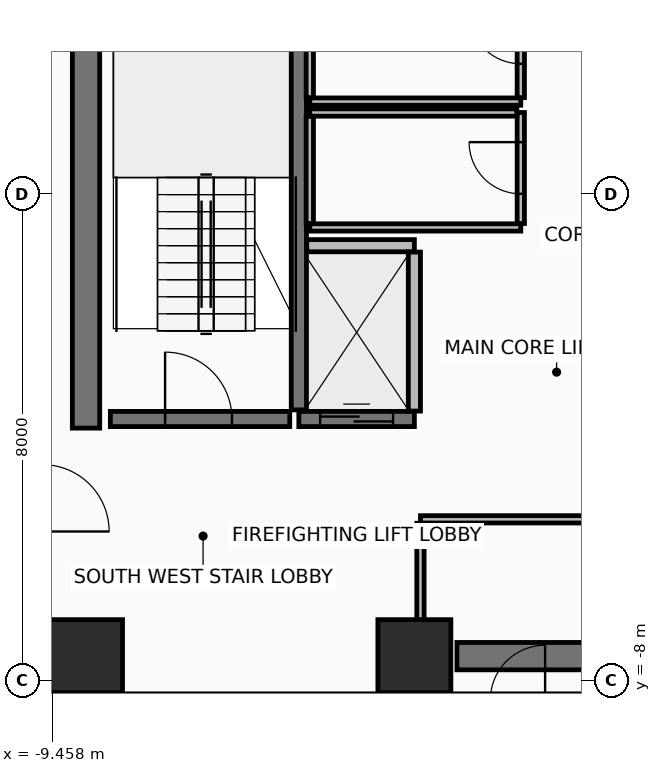
"""IFC4 building model, lengths in metres.
Left out: names, types, materials, properties, quantities, classifications, styles, units other than length and angle.
Written with IfcOpenShell. Run it as: python <this file> out.ifc"""

import sys

from ifc_helpers import new_model, si_unit, direction, frame, frame_2d, origin, origin_2d, place, context, subcontext, project, spatial, rectangle, extrude, element, fill, save


model = new_model("IFC4")
c1 = context("Model", 3, precision=1e-05, world=origin(), true_north=direction((0.0, 1.0)))
c2 = subcontext(c1, "Body", "Model", "MODEL_VIEW")
j1 = project(units=[si_unit("LENGTHUNIT", "METRE"), si_unit("PLANEANGLEUNIT", "RADIAN")], contexts=[c1])
p1 = place(None, origin())
s1 = spatial("IfcSite", under=j1, at=p1, CompositionType="ELEMENT")
p2 = place(p1, origin())
s2 = spatial("IfcBuilding", under=s1, at=p2, CompositionType="ELEMENT")
p3 = place(p2, frame((0.0, 0.0, 204.05)))
s3 = spatial("IfcBuildingStorey", under=s2, at=p3, CompositionType="ELEMENT", Elevation=204.05)
for number, where, z_axis, x_axis in (
    (1, (-8.9, -7.6, 0.0), (0.0, 0.0, 1.0), (1.0, 0.0, 0.0)),
    (2, (-3.5, -7.6, 0.0), (0.0, 0.0, 1.0), (1.0, 0.0, 0.0)),
):
    element("IfcColumn", number, at=place(p3, frame(where, z_axis=z_axis, x_axis=x_axis)), inside=s3, PredefinedType="COLUMN", context=c2, shape_type="SweptSolid", body=[
        extrude(rectangle(XDim=1.2, YDim=1.2, at=origin_2d()), origin(), (0.0, 0.0, 1.0), 3.6),
    ])
p4 = place(p3, frame((-2.8, -7.6, 0.0), z_axis=(0.0, 0.0, 1.0), x_axis=(1.0, 0.0, 0.0)))
e3 = element("IfcWall", 3, at=p4, inside=s3, PredefinedType="SHEAR", context=c2, shape_type="SweptSolid", body=[
    extrude(rectangle(XDim=5.38, YDim=0.45, at=frame_2d((2.69, 0.0))), origin(), (0.0, 0.0, 1.0), 3.42),
])
p5 = place(p3, frame((-8.9, -3.85, 0.0), z_axis=(0.0, 0.0, 1.0), x_axis=(0.0, 1.0, 0.0)))
e4 = element("IfcWall", 4, at=p5, inside=s3, PredefinedType="SHEAR", context=c2, shape_type="SweptSolid", body=[
    extrude(rectangle(XDim=10.7, YDim=0.45, at=frame_2d((5.35, 0.0))), origin(), (0.0, 0.0, 1.0), 3.42),
])
p6 = place(p3, frame((-5.4, -3.55, 0.0), z_axis=(0.0, 0.0, 1.0), x_axis=(0.0, 1.0, 0.0)))
e5 = element("IfcWall", 5, at=p6, inside=s3, PredefinedType="SHEAR", context=c2, shape_type="SweptSolid", body=[
    extrude(rectangle(XDim=7.3, YDim=0.25, at=frame_2d((3.65, 0.0))), origin(), (0.0, 0.0, 1.0), 3.42),
])
p7 = place(p3, frame((-8.5, -3.7, 0.0), z_axis=(0.0, 0.0, 1.0), x_axis=(1.0, 0.0, 0.0)))
e6 = element("IfcWall", 6, at=p7, inside=s3, PredefinedType="SHEAR", context=c2, shape_type="SweptSolid", body=[
    extrude(rectangle(XDim=2.95, YDim=0.25, at=frame_2d((1.475, 0.0))), origin(), (0.0, 0.0, 1.0), 3.42),
])
p8 = place(p7, frame((0.9, 0.0, 0.0)))
e7 = element("IfcOpeningElement", 7, at=p8, cuts=e6, PredefinedType="OPENING", context=c2, shape_type="SweptSolid", body=[
    extrude(rectangle(XDim=1.1, YDim=2.15, at=frame_2d((0.55, 1.075))), frame((0.0, 0.135, 0.0), z_axis=(0.0, -1.0, 0.0), x_axis=(1.0, 0.0, 0.0)), (0.0, 0.0, 1.0), 0.27),
])
p9 = place(p3, frame((-5.4, -3.7, 0.0), z_axis=(0.0, 0.0, 1.0), x_axis=(1.0, 0.0, 0.0)))
e8 = element("IfcWall", 8, at=p9, inside=s3, PredefinedType="SHEAR", context=c2, shape_type="SweptSolid", body=[
    extrude(rectangle(XDim=1.9, YDim=0.25, at=frame_2d((0.95, 0.0))), origin(), (0.0, 0.0, 1.0), 3.42),
])
p10 = place(p9, frame((0.35, 0.0, 0.0)))
e9 = element("IfcOpeningElement", 9, at=p10, cuts=e8, PredefinedType="OPENING", context=c2, shape_type="SweptSolid", body=[
    extrude(rectangle(XDim=1.2, YDim=2.2, at=frame_2d((0.6, 1.1))), frame((0.0, 0.135, 0.0), z_axis=(0.0, -1.0, 0.0), x_axis=(1.0, 0.0, 0.0)), (0.0, 0.0, 1.0), 0.27),
])
p11 = place(p3, frame((-5.27, -0.85, 0.0), z_axis=(0.0, 0.0, 1.0), x_axis=(1.0, 0.0, 0.0)))
e10 = element("IfcWall", 10, at=p11, inside=s3, PredefinedType="PARTITIONING", context=c2, shape_type="SweptSolid", body=[
    extrude(rectangle(XDim=1.77, YDim=0.2, at=frame_2d((0.885, 0.0))), origin(), (0.0, 0.0, 1.0), 3.42),
])
p12 = place(p3, frame((-3.5, -3.57, 0.0), z_axis=(0.0, 0.0, 1.0), x_axis=(0.0, 1.0, 0.0)))
e11 = element("IfcWall", 11, at=p12, inside=s3, PredefinedType="PARTITIONING", context=c2, shape_type="SweptSolid", body=[
    extrude(rectangle(XDim=2.615, YDim=0.2, at=frame_2d((1.308, 0.0))), origin(), (0.0, 0.0, 1.0), 3.42),
])
p13 = place(p3, frame((-5.22, 1.52, 0.0), z_axis=(0.0, 0.0, 1.0), x_axis=(1.0, 0.0, 0.0)))
e12 = element("IfcWall", 12, at=p13, inside=s3, PredefinedType="PARTITIONING", context=c2, shape_type="SweptSolid", body=[
    extrude(rectangle(XDim=3.47, YDim=0.12, at=frame_2d((1.735, 0.0))), origin(), (0.0, 0.0, 1.0), 3.42),
])
p14 = place(p3, frame((-1.75, 1.585, 0.0), z_axis=(0.0, 0.0, 1.0), x_axis=(0.0, 1.0, 0.0)))
e13 = element("IfcWall", 13, at=p14, inside=s3, PredefinedType="PARTITIONING", context=c2, shape_type="SweptSolid", body=[
    extrude(rectangle(XDim=1.965, YDim=0.12, at=frame_2d((0.982, 0.0))), origin(), (0.0, 0.0, 1.0), 3.42),
])
p15 = place(p14, frame((0.557, 0.0, 0.0)))
e14 = element("IfcOpeningElement", 14, at=p15, cuts=e13, PredefinedType="OPENING", context=c2, shape_type="SweptSolid", body=[
    extrude(rectangle(XDim=0.85, YDim=2.1, at=frame_2d((0.425, 1.05))), frame((0.0, 0.07, 0.0), z_axis=(0.0, -1.0, 0.0), x_axis=(1.0, 0.0, 0.0)), (0.0, 0.0, 1.0), 0.14),
])
p16 = place(p3, frame((-5.22, 3.485, 0.0), z_axis=(0.0, 0.0, 1.0), x_axis=(0.0, -1.0, 0.0)))
e15 = element("IfcWall", 15, at=p16, inside=s3, PredefinedType="PARTITIONING", context=c2, shape_type="SweptSolid", body=[
    extrude(rectangle(XDim=1.9, YDim=0.12, at=frame_2d((0.95, 0.0))), origin(), (0.0, 0.0, 1.0), 3.42),
])
p17 = place(p3, frame((-5.22, -0.55, 0.0), z_axis=(0.0, 0.0, 1.0), x_axis=(1.0, 0.0, 0.0)))
e16 = element("IfcWall", 16, at=p17, inside=s3, PredefinedType="PARTITIONING", context=c2, shape_type="SweptSolid", body=[
    extrude(rectangle(XDim=3.47, YDim=0.12, at=frame_2d((1.735, 0.0))), origin(), (0.0, 0.0, 1.0), 3.42),
])
p18 = place(p3, frame((-1.75, -0.485, 0.0), z_axis=(0.0, 0.0, 1.0), x_axis=(0.0, 1.0, 0.0)))
e17 = element("IfcWall", 17, at=p18, inside=s3, PredefinedType="PARTITIONING", context=c2, shape_type="SweptSolid", body=[
    extrude(rectangle(XDim=1.825, YDim=0.12, at=frame_2d((0.913, 0.0))), origin(), (0.0, 0.0, 1.0), 3.42),
])
p19 = place(p18, frame((0.488, 0.0, 0.0)))
e18 = element("IfcOpeningElement", 18, at=p19, cuts=e17, PredefinedType="OPENING", context=c2, shape_type="SweptSolid", body=[
    extrude(rectangle(XDim=0.85, YDim=2.1, at=frame_2d((0.425, 1.05))), frame((0.0, 0.07, 0.0), z_axis=(0.0, -1.0, 0.0), x_axis=(1.0, 0.0, 0.0)), (0.0, 0.0, 1.0), 0.14),
])
p20 = place(p3, frame((-1.815, 1.34, 0.0), z_axis=(0.0, 0.0, 1.0), x_axis=(-1.0, 0.0, 0.0)))
e19 = element("IfcWall", 19, at=p20, inside=s3, PredefinedType="PARTITIONING", context=c2, shape_type="SweptSolid", body=[
    extrude(rectangle(XDim=3.405, YDim=0.12, at=frame_2d((1.703, 0.0))), origin(), (0.0, 0.0, 1.0), 3.42),
])
p21 = place(p3, frame((-5.22, 1.275, 0.0), z_axis=(0.0, 0.0, 1.0), x_axis=(0.0, -1.0, 0.0)))
e20 = element("IfcWall", 20, at=p21, inside=s3, PredefinedType="PARTITIONING", context=c2, shape_type="SweptSolid", body=[
    extrude(rectangle(XDim=1.76, YDim=0.12, at=frame_2d((0.88, 0.0))), origin(), (0.0, 0.0, 1.0), 3.42),
])
p22 = place(p3, frame((-0.265, -5.35, 0.0), z_axis=(0.0, 0.0, 1.0), x_axis=(-1.0, 0.0, 0.0)))
e21 = element("IfcWall", 21, at=p22, inside=s3, PredefinedType="PARTITIONING", context=c2, shape_type="SweptSolid", body=[
    extrude(rectangle(XDim=3.135, YDim=0.12, at=frame_2d((1.567, 0.0))), origin(), (0.0, 0.0, 1.0), 2.715),
])
p23 = place(p3, frame((-3.4, -5.415, 0.0), z_axis=(0.0, 0.0, 1.0), x_axis=(0.0, -1.0, 0.0)))
e22 = element("IfcWall", 22, at=p23, inside=s3, PredefinedType="PARTITIONING", context=c2, shape_type="SweptSolid", body=[
    extrude(rectangle(XDim=2.8, YDim=0.12, at=frame_2d((1.4, 0.0))), origin(), (0.0, 0.0, 1.0), 2.715),
])
p24 = place(p8, origin())
e23 = element("IfcDoor", 23, at=p24, inside=s3, OperationType="SINGLE_SWING_LEFT", PredefinedType="DOOR", context=c2, shape_type="SweptSolid", body=[
    extrude(rectangle(XDim=1.1, YDim=2.15, at=frame_2d((0.55, 1.075))), frame((0.0, 0.025, 0.0), z_axis=(0.0, -1.0, 0.0), x_axis=(1.0, 0.0, 0.0)), (0.0, 0.0, 1.0), 0.05),
])
fill(e7, e23)
p25 = place(p10, origin())
e24 = element("IfcDoor", 24, at=p25, inside=s3, OperationType="SLIDING_TO_RIGHT", PredefinedType="DOOR", context=c2, shape_type="SweptSolid", body=[
    extrude(rectangle(XDim=1.2, YDim=2.2, at=frame_2d((0.6, 1.1))), frame((0.0, 0.025, 0.0), z_axis=(0.0, -1.0, 0.0), x_axis=(1.0, 0.0, 0.0)), (0.0, 0.0, 1.0), 0.05),
])
fill(e9, e24)
p26 = place(p15, frame((0.85, 0.0, 0.0), z_axis=(0.0, 0.0, 1.0), x_axis=(-1.0, 0.0, 0.0)))
e25 = element("IfcDoor", 25, at=p26, inside=s3, OperationType="SINGLE_SWING_RIGHT", PredefinedType="DOOR", context=c2, shape_type="SweptSolid", body=[
    extrude(rectangle(XDim=0.85, YDim=2.1, at=frame_2d((0.425, 1.05))), frame((0.0, 0.025, 0.0), z_axis=(0.0, -1.0, 0.0), x_axis=(1.0, 0.0, 0.0)), (0.0, 0.0, 1.0), 0.05),
])
fill(e14, e25)
p27 = place(p19, frame((0.85, 0.0, 0.0), z_axis=(0.0, 0.0, 1.0), x_axis=(-1.0, 0.0, 0.0)))
e26 = element("IfcDoor", 26, at=p27, inside=s3, OperationType="SINGLE_SWING_RIGHT", PredefinedType="DOOR", context=c2, shape_type="SweptSolid", body=[
    extrude(rectangle(XDim=0.85, YDim=2.1, at=frame_2d((0.425, 1.05))), frame((0.0, 0.025, 0.0), z_axis=(0.0, -1.0, 0.0), x_axis=(1.0, 0.0, 0.0)), (0.0, 0.0, 1.0), 0.05),
])
fill(e18, e26)
save(model, sys.argv[1])
